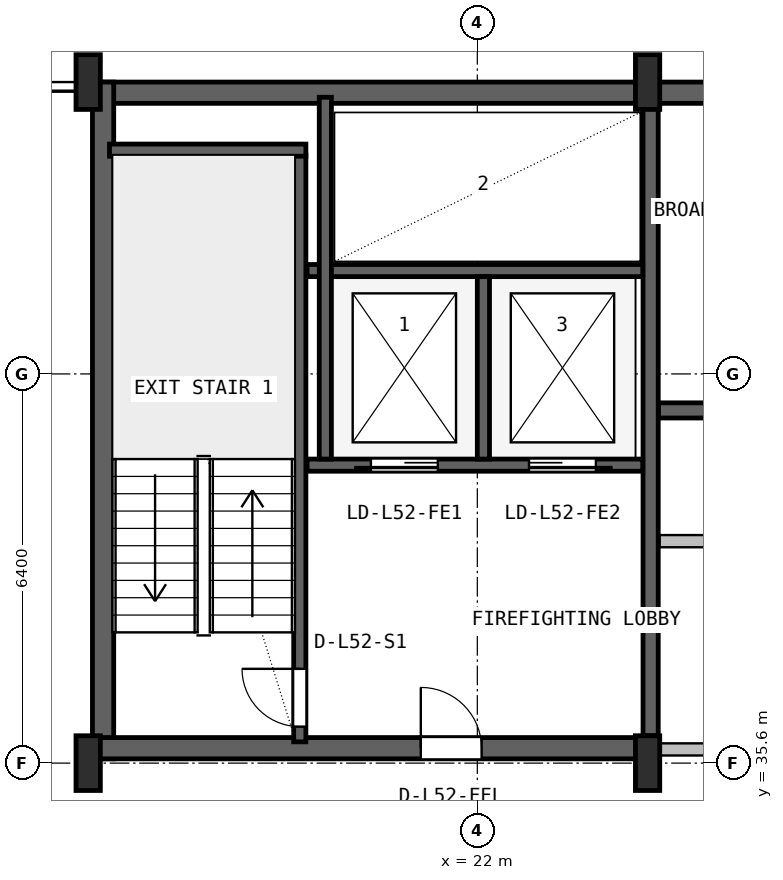
"""IFC4 building model, lengths in metres.
Left out: names, types, materials, properties, quantities, classifications, styles, units other than length and angle.
Written with IfcOpenShell. Run it as: python <this file> out.ifc"""

import sys

from ifc_helpers import new_model, si_unit, direction, frame, frame_2d, origin, origin_2d, place, context, subcontext, project, spatial, rectangle, i_section, extrude, source, transform, mapped, element, fill, save


model = new_model("IFC4")
c1 = context("Model", 3, precision=1e-05, world=origin(), true_north=direction((0.0, 1.0)))
c2 = subcontext(c1, "Body", "Model", "MODEL_VIEW")
j1 = project(units=[si_unit("LENGTHUNIT", "METRE"), si_unit("PLANEANGLEUNIT", "RADIAN")], contexts=[c1])
p1 = place(None, origin())
s1 = spatial("IfcSite", under=j1, at=p1, CompositionType="ELEMENT")
p2 = place(p1, origin())
s2 = spatial("IfcBuilding", under=s1, at=p2, CompositionType="ELEMENT")
p3 = place(p2, frame((0.0, 0.0, 211.2)))
s3 = spatial("IfcBuildingStorey", under=s2, at=p3, CompositionType="ELEMENT", Elevation=211.2)
p4 = place(p3, frame((15.6, 46.625, 0.0), z_axis=(0.0, 0.0, 1.0), x_axis=(1.0, 0.0, 0.0)))
e1 = element("IfcWall", 1, at=p4, inside=s3, PredefinedType="SHEAR", context=c2, shape_type="SweptSolid", body=[
    extrude(rectangle(XDim=36.8, YDim=0.35, at=frame_2d((18.4, 0.0))), origin(), (0.0, 0.0, 1.0), 3.55),
])
p5 = place(p3, frame((15.845, 35.67, 0.0), z_axis=(0.0, 0.0, 1.0), x_axis=(0.0, 1.0, 0.0)))
e2 = element("IfcWall", 2, at=p5, inside=s3, PredefinedType="SHEAR", context=c2, shape_type="SweptSolid", body=[
    extrude(rectangle(XDim=11.13, YDim=0.35, at=frame_2d((5.565, 0.0))), origin(), (0.0, 0.0, 1.0), 3.55),
])
p6 = place(p3, frame((15.67, 35.845, 0.0), z_axis=(0.0, 0.0, 1.0), x_axis=(1.0, 0.0, 0.0)))
e3 = element("IfcWall", 3, at=p6, inside=s3, PredefinedType="SHEAR", context=c2, shape_type="SweptSolid", body=[
    extrude(rectangle(XDim=9.13, YDim=0.35, at=frame_2d((4.565, 0.0))), origin(), (0.0, 0.0, 1.0), 3.55),
])
p7 = place(p6, frame((5.4, 0.0, 0.0)))
e4 = element("IfcOpeningElement", 4, at=p7, cuts=e3, PredefinedType="OPENING", context=c2, shape_type="SweptSolid", body=[
    extrude(rectangle(XDim=1.0, YDim=2.1, at=frame_2d((0.5, 1.05))), frame((0.0, 0.185, 0.0), z_axis=(0.0, -1.0, 0.0), x_axis=(1.0, 0.0, 0.0)), (0.0, 0.0, 1.0), 0.37),
])
m1 = source(origin(), c2, "Body", "SweptSolid", [
    extrude(i_section(OverallWidth=0.4, OverallDepth=0.9, WebThickness=0.016, FlangeThickness=0.028, FilletRadius=0.016, at=origin_2d()), origin(), (0.0, 0.0, 1.0), 3.8),
])
for number, where, z_axis, x_axis in (
    (5, (15.6, 35.6, 0.0), (0.0, 0.0, 1.0), (1.0, 0.0, 0.0)),
    (6, (15.6, 46.8, 0.0), (0.0, 0.0, 1.0), (1.0, 0.0, 0.0)),
    (7, (24.8, 35.6, 0.0), (0.0, 0.0, 1.0), (1.0, 0.0, 0.0)),
    (8, (24.8, 46.8, 0.0), (0.0, 0.0, 1.0), (1.0, 0.0, 0.0)),
):
    element("IfcColumn", number, at=place(p3, frame(where, z_axis=z_axis, x_axis=x_axis)), inside=s3, PredefinedType="COLUMN", context=c2, shape_type="MappedRepresentation", body=[
        mapped(m1, transform((0.0, 0.0, 0.0), x_axis=(1.0, 0.0, 0.0), y_axis=(0.0, 1.0, 0.0), z_axis=(0.0, 0.0, 1.0), scale=1.0)),
    ])
p8 = place(p3, frame((19.08, 35.95, 0.0), z_axis=(0.0, 0.0, 1.0), x_axis=(0.0, 1.0, 0.0)))
e9 = element("IfcWall", 9, at=p8, inside=s3, PredefinedType="SHEAR", context=c2, shape_type="SweptSolid", body=[
    extrude(rectangle(XDim=9.65, YDim=0.2, at=frame_2d((4.825, 0.0))), origin(), (0.0, 0.0, 1.0), 3.55),
])
p9 = place(p8, frame((0.25, 0.0, 0.0)))
e10 = element("IfcOpeningElement", 10, at=p9, cuts=e9, PredefinedType="OPENING", context=c2, shape_type="SweptSolid", body=[
    extrude(rectangle(XDim=0.95, YDim=2.1, at=frame_2d((0.475, 1.05))), frame((0.0, 0.11, 0.0), z_axis=(0.0, -1.0, 0.0), x_axis=(1.0, 0.0, 0.0)), (0.0, 0.0, 1.0), 0.22),
])
p10 = place(p3, frame((15.95, 45.68, 0.0), z_axis=(0.0, 0.0, 1.0), x_axis=(1.0, 0.0, 0.0)))
e11 = element("IfcWall", 11, at=p10, inside=s3, PredefinedType="SHEAR", context=c2, shape_type="SweptSolid", body=[
    extrude(rectangle(XDim=3.23, YDim=0.2, at=frame_2d((1.615, 0.0))), origin(), (0.0, 0.0, 1.0), 3.55),
])
p11 = place(p3, frame((24.85, 36.05, 0.0), z_axis=(0.0, 0.0, 1.0), x_axis=(0.0, 1.0, 0.0)))
e12 = element("IfcWall", 12, at=p11, inside=s3, PredefinedType="SHEAR", context=c2, shape_type="SweptSolid", body=[
    extrude(rectangle(XDim=10.45, YDim=0.25, at=frame_2d((5.225, 0.0))), origin(), (0.0, 0.0, 1.0), 3.55),
])
p12 = place(p3, frame((19.2, 40.5, 0.0), z_axis=(0.0, 0.0, 1.0), x_axis=(1.0, 0.0, 0.0)))
e13 = element("IfcWall", 13, at=p12, inside=s3, PredefinedType="SHEAR", context=c2, shape_type="SweptSolid", body=[
    extrude(rectangle(XDim=5.52, YDim=0.2, at=frame_2d((2.76, 0.0))), origin(), (0.0, 0.0, 1.0), 3.55),
])
p13 = place(p12, frame((1.05, 0.0, 0.0)))
e14 = element("IfcOpeningElement", 14, at=p13, cuts=e13, PredefinedType="OPENING", context=c2, shape_type="SweptSolid", body=[
    extrude(rectangle(XDim=1.1, YDim=2.18, at=frame_2d((0.55, 1.09))), frame((0.0, 0.11, 0.0), z_axis=(0.0, -1.0, 0.0), x_axis=(1.0, 0.0, 0.0)), (0.0, 0.0, 1.0), 0.22),
])
p14 = place(p12, frame((3.65, 0.0, 0.0)))
e15 = element("IfcOpeningElement", 15, at=p14, cuts=e13, PredefinedType="OPENING", context=c2, shape_type="SweptSolid", body=[
    extrude(rectangle(XDim=1.1, YDim=2.18, at=frame_2d((0.55, 1.09))), frame((0.0, 0.11, 0.0), z_axis=(0.0, -1.0, 0.0), x_axis=(1.0, 0.0, 0.0)), (0.0, 0.0, 1.0), 0.22),
])
p15 = place(p3, frame((19.2, 43.7, 0.0), z_axis=(0.0, 0.0, 1.0), x_axis=(1.0, 0.0, 0.0)))
e16 = element("IfcWall", 16, at=p15, inside=s3, PredefinedType="SHEAR", context=c2, shape_type="SweptSolid", body=[
    extrude(rectangle(XDim=5.52, YDim=0.2, at=frame_2d((2.76, 0.0))), origin(), (0.0, 0.0, 1.0), 3.55),
])
p16 = place(p3, frame((22.1, 40.6, 0.0), z_axis=(0.0, 0.0, 1.0), x_axis=(0.0, 1.0, 0.0)))
e17 = element("IfcWall", 17, at=p16, inside=s3, PredefinedType="SHEAR", context=c2, shape_type="SweptSolid", body=[
    extrude(rectangle(XDim=3.0, YDim=0.2, at=frame_2d((1.5, 0.0))), origin(), (0.0, 0.0, 1.0), 3.55),
])
p17 = place(p3, frame((19.5, 40.6, 0.0), z_axis=(0.0, 0.0, 1.0), x_axis=(0.0, 1.0, 0.0)))
e18 = element("IfcWall", 18, at=p17, inside=s3, PredefinedType="SHEAR", context=c2, shape_type="SweptSolid", body=[
    extrude(rectangle(XDim=5.95, YDim=0.2, at=frame_2d((2.975, 0.0))), origin(), (0.0, 0.0, 1.0), 3.55),
])
p18 = place(p3, frame((24.98, 41.4, 0.0), z_axis=(0.0, 0.0, 1.0), x_axis=(1.0, 0.0, 0.0)))
e19 = element("IfcWall", 19, at=p18, inside=s3, PredefinedType="SHEAR", context=c2, shape_type="SweptSolid", body=[
    extrude(rectangle(XDim=23.82, YDim=0.25, at=frame_2d((11.91, 0.0))), origin(), (0.0, 0.0, 1.0), 3.55),
])
p19 = place(p18, frame((16.87, 0.0, 0.0)))
e20 = element("IfcOpeningElement", 20, at=p19, cuts=e19, PredefinedType="OPENING", context=c2, shape_type="SweptSolid", body=[
    extrude(rectangle(XDim=1.1, YDim=2.18, at=frame_2d((0.55, 1.09))), frame((0.0, 0.135, 0.0), z_axis=(0.0, -1.0, 0.0), x_axis=(1.0, 0.0, 0.0)), (0.0, 0.0, 1.0), 0.27),
])
p20 = place(p18, frame((19.47, 0.0, 0.0)))
e21 = element("IfcOpeningElement", 21, at=p20, cuts=e19, PredefinedType="OPENING", context=c2, shape_type="SweptSolid", body=[
    extrude(rectangle(XDim=1.1, YDim=2.18, at=frame_2d((0.55, 1.09))), frame((0.0, 0.135, 0.0), z_axis=(0.0, -1.0, 0.0), x_axis=(1.0, 0.0, 0.0)), (0.0, 0.0, 1.0), 0.27),
])
p21 = place(p18, frame((22.07, 0.0, 0.0)))
e22 = element("IfcOpeningElement", 22, at=p21, cuts=e19, PredefinedType="OPENING", context=c2, shape_type="SweptSolid", body=[
    extrude(rectangle(XDim=1.1, YDim=2.18, at=frame_2d((0.55, 1.09))), frame((0.0, 0.135, 0.0), z_axis=(0.0, -1.0, 0.0), x_axis=(1.0, 0.0, 0.0)), (0.0, 0.0, 1.0), 0.27),
])
p22 = place(p18, frame((3.56, 0.0, 0.0)))
e23 = element("IfcOpeningElement", 23, at=p22, cuts=e19, PredefinedType="OPENING", context=c2, shape_type="SweptSolid", body=[
    extrude(rectangle(XDim=1.0, YDim=2.08, at=frame_2d((0.5, 1.04))), frame((0.0, 0.135, 0.0), z_axis=(0.0, -1.0, 0.0), x_axis=(1.0, 0.0, 0.0)), (0.0, 0.0, 1.0), 0.27),
])
p23 = place(p18, frame((9.76, 0.0, 0.0)))
e24 = element("IfcOpeningElement", 24, at=p23, cuts=e19, PredefinedType="OPENING", context=c2, shape_type="SweptSolid", body=[
    extrude(rectangle(XDim=0.92, YDim=2.08, at=frame_2d((0.46, 1.04))), frame((0.0, 0.135, 0.0), z_axis=(0.0, -1.0, 0.0), x_axis=(1.0, 0.0, 0.0)), (0.0, 0.0, 1.0), 0.27),
])
p24 = place(p18, frame((13.66, 0.0, 0.0)))
e25 = element("IfcOpeningElement", 25, at=p24, cuts=e19, PredefinedType="OPENING", context=c2, shape_type="SweptSolid", body=[
    extrude(rectangle(XDim=0.92, YDim=2.08, at=frame_2d((0.46, 1.04))), frame((0.0, 0.135, 0.0), z_axis=(0.0, -1.0, 0.0), x_axis=(1.0, 0.0, 0.0)), (0.0, 0.0, 1.0), 0.27),
])
p25 = place(p3, frame((25.0, 35.825, 0.0), z_axis=(0.0, 0.0, 1.0), x_axis=(1.0, 0.0, 0.0)))
e26 = element("IfcWall", 26, at=p25, inside=s3, PredefinedType="PLUMBINGWALL", context=c2, shape_type="SweptSolid", body=[
    extrude(rectangle(XDim=9.75, YDim=0.2, at=frame_2d((4.875, 0.0))), origin(), (0.0, 0.0, 1.0), 2.575),
])
p26 = place(p3, frame((25.0, 39.25, 0.0), z_axis=(0.0, 0.0, 1.0), x_axis=(1.0, 0.0, 0.0)))
e27 = element("IfcWall", 27, at=p26, inside=s3, PredefinedType="PLUMBINGWALL", context=c2, shape_type="SweptSolid", body=[
    extrude(rectangle(XDim=9.75, YDim=0.2, at=frame_2d((4.875, 0.0))), origin(), (0.0, 0.0, 1.0), 3.53),
])
p27 = place(p26, frame((1.75, 0.0, 0.0)))
e28 = element("IfcOpeningElement", 28, at=p27, cuts=e27, PredefinedType="OPENING", context=c2, shape_type="SweptSolid", body=[
    extrude(rectangle(XDim=0.9, YDim=2.06, at=frame_2d((0.45, 1.03))), frame((0.0, 0.11, 0.0), z_axis=(0.0, -1.0, 0.0), x_axis=(1.0, 0.0, 0.0)), (0.0, 0.0, 1.0), 0.22),
])
p28 = place(p26, frame((6.725, 0.0, 0.0)))
e29 = element("IfcOpeningElement", 29, at=p28, cuts=e27, PredefinedType="OPENING", context=c2, shape_type="SweptSolid", body=[
    extrude(rectangle(XDim=0.9, YDim=2.06, at=frame_2d((0.45, 1.03))), frame((0.0, 0.11, 0.0), z_axis=(0.0, -1.0, 0.0), x_axis=(1.0, 0.0, 0.0)), (0.0, 0.0, 1.0), 0.22),
])
m2 = source(origin(), c2, "Body", "SweptSolid", [
    extrude(rectangle(XDim=0.95, YDim=2.1, at=frame_2d((0.475, 1.05))), frame((0.0, 0.025, 0.0), z_axis=(0.0, -1.0, 0.0), x_axis=(1.0, 0.0, 0.0)), (0.0, 0.0, 1.0), 0.05),
])
p29 = place(p9, origin())
e30 = element("IfcDoor", 30, at=p29, inside=s3, OperationType="SINGLE_SWING_RIGHT", PredefinedType="DOOR", context=c2, shape_type="MappedRepresentation", body=[
    mapped(m2, transform((0.0, 0.0, 0.0), x_axis=(1.0, 0.0, 0.0), y_axis=(0.0, 1.0, 0.0), z_axis=(0.0, 0.0, 1.0), scale=1.0)),
])
fill(e10, e30)
m3 = source(origin(), c2, "Body", "SweptSolid", [
    extrude(rectangle(XDim=1.0, YDim=2.1, at=frame_2d((0.5, 1.05))), frame((0.0, 0.025, 0.0), z_axis=(0.0, -1.0, 0.0), x_axis=(1.0, 0.0, 0.0)), (0.0, 0.0, 1.0), 0.05),
])
p30 = place(p7, origin())
e31 = element("IfcDoor", 31, at=p30, inside=s3, OperationType="SINGLE_SWING_LEFT", PredefinedType="DOOR", context=c2, shape_type="MappedRepresentation", body=[
    mapped(m3, transform((0.0, 0.0, 0.0), x_axis=(1.0, 0.0, 0.0), y_axis=(0.0, 1.0, 0.0), z_axis=(0.0, 0.0, 1.0), scale=1.0)),
])
fill(e4, e31)
m4 = source(origin(), c2, "Body", "SweptSolid", [
    extrude(rectangle(XDim=1.1, YDim=2.18, at=frame_2d((0.55, 1.09))), frame((0.0, 0.025, 0.0), z_axis=(0.0, -1.0, 0.0), x_axis=(1.0, 0.0, 0.0)), (0.0, 0.0, 1.0), 0.05),
])
p31 = place(p13, frame((1.1, 0.0, 0.0), z_axis=(0.0, 0.0, 1.0), x_axis=(-1.0, 0.0, 0.0)))
e32 = element("IfcDoor", 32, at=p31, inside=s3, OperationType="SLIDING_TO_LEFT", PredefinedType="DOOR", context=c2, shape_type="MappedRepresentation", body=[
    mapped(m4, transform((0.0, 0.0, 0.0), x_axis=(1.0, 0.0, 0.0), y_axis=(0.0, 1.0, 0.0), z_axis=(0.0, 0.0, 1.0), scale=1.0)),
])
fill(e14, e32)
p32 = place(p14, frame((1.1, 0.0, 0.0), z_axis=(0.0, 0.0, 1.0), x_axis=(-1.0, 0.0, 0.0)))
e33 = element("IfcDoor", 33, at=p32, inside=s3, OperationType="SLIDING_TO_RIGHT", PredefinedType="DOOR", context=c2, shape_type="MappedRepresentation", body=[
    mapped(m4, transform((0.0, 0.0, 0.0), x_axis=(1.0, 0.0, 0.0), y_axis=(0.0, 1.0, 0.0), z_axis=(0.0, 0.0, 1.0), scale=1.0)),
])
fill(e15, e33)
save(model, sys.argv[1])
